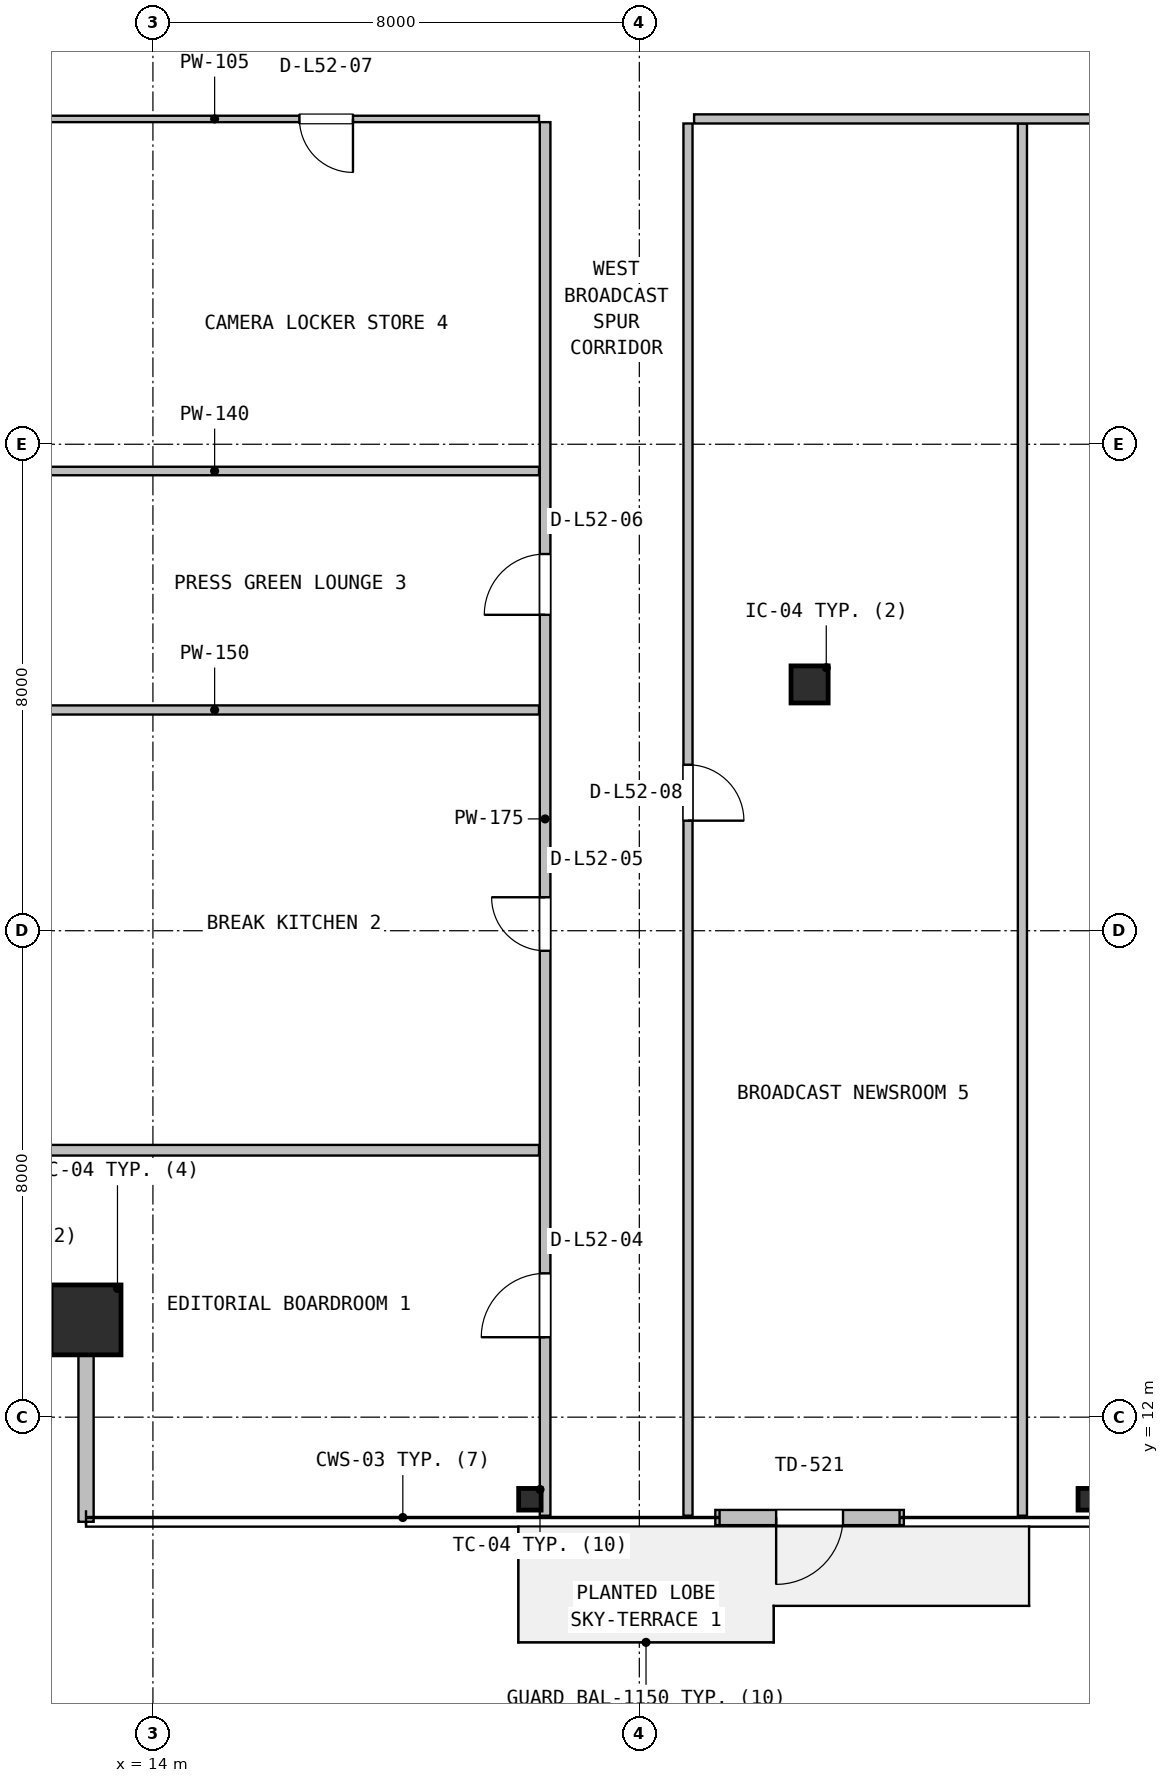
"""IFC4 building model, lengths in metres.
Left out: names, types, materials, properties, quantities, classifications, styles, units other than length and angle.
Written with IfcOpenShell. Run it as: python <this file> out.ifc"""

import sys

from ifc_helpers import new_model, si_unit, direction, frame, frame_2d, origin, origin_2d, place, context, subcontext, project, spatial, rectangle, hollow_rectangle, hollow_circle, i_section, extrude, source, transform, mapped, element, fill, save


model = new_model("IFC4")
c1 = context("Model", 3, precision=1e-05, world=origin(), true_north=direction((0.0, 1.0)))
c2 = subcontext(c1, "Body", "Model", "MODEL_VIEW")
j1 = project(units=[si_unit("LENGTHUNIT", "METRE"), si_unit("PLANEANGLEUNIT", "RADIAN")], contexts=[c1])
p1 = place(None, origin())
s1 = spatial("IfcSite", under=j1, at=p1, CompositionType="ELEMENT")
p2 = place(p1, origin())
s2 = spatial("IfcBuilding", under=s1, at=p2, CompositionType="ELEMENT")
p3 = place(p2, frame((0.0, 0.0, 211.2)))
s3 = spatial("IfcBuildingStorey", under=s2, at=p3, CompositionType="ELEMENT", Elevation=211.2)
m1 = source(origin(), c2, "Body", "SweptSolid", [
    extrude(hollow_rectangle(XDim=1.15, YDim=1.15, WallThickness=0.045, at=origin_2d()), origin(), (0.0, 0.0, 1.0), 3.8),
])
p4 = place(p3, frame((12.9, 13.6, 0.0), z_axis=(0.0, 0.0, 1.0), x_axis=(1.0, 0.0, 0.0)))
e1 = element("IfcColumn", 1, at=p4, inside=s3, PredefinedType="COLUMN", context=c2, shape_type="MappedRepresentation", body=[
    mapped(m1, transform((0.0, 0.0, 0.0), x_axis=(1.0, 0.0, 0.0), y_axis=(0.0, 1.0, 0.0), z_axis=(0.0, 0.0, 1.0), scale=1.0)),
])
m2 = source(origin(), c2, "Body", "SweptSolid", [
    extrude(i_section(OverallWidth=0.369, OverallDepth=0.356, WebThickness=0.011, FlangeThickness=0.018, FilletRadius=0.016, at=origin_2d()), origin(), (0.0, 0.0, 1.0), 3.8),
])
for number, where, z_axis, x_axis in (
    (2, (20.2, 10.65, 0.0), (0.0, 0.0, 1.0), (1.0, 0.0, 0.0)),
    (3, (29.4, 10.65, 0.0), (0.0, 0.0, 1.0), (1.0, 0.0, 0.0)),
):
    element("IfcColumn", number, at=place(p3, frame(where, z_axis=z_axis, x_axis=x_axis)), inside=s3, PredefinedType="COLUMN", context=c2, shape_type="MappedRepresentation", body=[
        mapped(m2, transform((0.0, 0.0, 0.0), x_axis=(1.0, 0.0, 0.0), y_axis=(0.0, 1.0, 0.0), z_axis=(0.0, 0.0, 1.0), scale=1.0)),
    ])
m3 = source(origin(), c2, "Body", "SweptSolid", [
    extrude(hollow_circle(Radius=0.305, WallThickness=0.025, at=origin_2d()), origin(), (0.0, 0.0, 1.0), 3.8),
])
p5 = place(p3, frame((24.8, 24.05, 0.0), z_axis=(0.0, 0.0, 1.0), x_axis=(1.0, 0.0, 0.0)))
e4 = element("IfcColumn", 4, at=p5, inside=s3, PredefinedType="COLUMN", context=c2, shape_type="MappedRepresentation", body=[
    mapped(m3, transform((0.0, 0.0, 0.0), x_axis=(1.0, 0.0, 0.0), y_axis=(0.0, 1.0, 0.0), z_axis=(0.0, 0.0, 1.0), scale=1.0)),
])
p6 = place(p3, frame((23.25, 10.35, 0.0), z_axis=(0.0, 0.0, 1.0), x_axis=(1.0, 0.0, 0.0)))
e5 = element("IfcWall", 5, at=p6, inside=s3, PredefinedType="SOLIDWALL", context=c2, shape_type="SweptSolid", body=[
    extrude(rectangle(XDim=3.1, YDim=0.25, at=frame_2d((1.55, 0.0))), origin(), (0.0, 0.0, 1.0), 3.53),
])
p7 = place(p6, frame((1.0, 0.0, 0.0)))
e6 = element("IfcOpeningElement", 6, at=p7, cuts=e5, PredefinedType="OPENING", context=c2, shape_type="SweptSolid", body=[
    extrude(rectangle(XDim=1.1, YDim=2.15, at=frame_2d((0.55, 1.075))), frame((0.0, 0.135, 0.0), z_axis=(0.0, -1.0, 0.0), x_axis=(1.0, 0.0, 0.0)), (0.0, 0.0, 1.0), 0.27),
])
p8 = place(p3, frame((12.9, 10.28, 0.0), z_axis=(0.0, 0.0, 1.0), x_axis=(0.0, 1.0, 0.0)))
e7 = element("IfcWall", 7, at=p8, inside=s3, PredefinedType="SOLIDWALL", context=c2, shape_type="SweptSolid", body=[
    extrude(rectangle(XDim=3.4, YDim=0.25, at=frame_2d((1.7, 0.0))), origin(), (0.0, 0.0, 1.0), 3.171),
])
p9 = place(p3, frame((20.45, 10.38, 0.0), z_axis=(0.0, 0.0, 1.0), x_axis=(0.0, 1.0, 0.0)))
e8 = element("IfcWall", 8, at=p9, inside=s3, PredefinedType="PARTITIONING", context=c2, shape_type="SweptSolid", body=[
    extrude(rectangle(XDim=22.917, YDim=0.175, at=frame_2d((11.458, 0.0))), origin(), (0.0, 0.0, 1.0), 3.171),
])
p10 = place(p9, frame((2.935, 0.0, 0.0)))
e9 = element("IfcOpeningElement", 9, at=p10, cuts=e8, PredefinedType="OPENING", context=c2, shape_type="SweptSolid", body=[
    extrude(rectangle(XDim=1.05, YDim=2.1, at=frame_2d((0.525, 1.05))), frame((0.0, 0.098, 0.0), z_axis=(0.0, -1.0, 0.0), x_axis=(1.0, 0.0, 0.0)), (0.0, 0.0, 1.0), 0.195),
])
p11 = place(p9, frame((9.29, 0.0, 0.0)))
e10 = element("IfcOpeningElement", 10, at=p11, cuts=e8, PredefinedType="OPENING", context=c2, shape_type="SweptSolid", body=[
    extrude(rectangle(XDim=0.88, YDim=2.06, at=frame_2d((0.44, 1.03))), frame((0.0, 0.098, 0.0), z_axis=(0.0, -1.0, 0.0), x_axis=(1.0, 0.0, 0.0)), (0.0, 0.0, 1.0), 0.195),
])
p12 = place(p9, frame((14.815, 0.0, 0.0)))
e11 = element("IfcOpeningElement", 11, at=p12, cuts=e8, PredefinedType="OPENING", context=c2, shape_type="SweptSolid", body=[
    extrude(rectangle(XDim=1.0, YDim=2.1, at=frame_2d((0.5, 1.05))), frame((0.0, 0.098, 0.0), z_axis=(0.0, -1.0, 0.0), x_axis=(1.0, 0.0, 0.0)), (0.0, 0.0, 1.0), 0.195),
])
p13 = place(p3, frame((9.68, 16.39, 0.0), z_axis=(0.0, 0.0, 1.0), x_axis=(1.0, 0.0, 0.0)))
e12 = element("IfcWall", 12, at=p13, inside=s3, PredefinedType="PARTITIONING", context=c2, shape_type="SweptSolid", body=[
    extrude(rectangle(XDim=10.67, YDim=0.175, at=frame_2d((5.335, 0.0))), origin(), (0.0, 0.0, 1.0), 3.171),
])
p14 = place(p3, frame((9.68, 23.63, 0.0), z_axis=(0.0, 0.0, 1.0), x_axis=(1.0, 0.0, 0.0)))
e13 = element("IfcWall", 13, at=p14, inside=s3, PredefinedType="PARTITIONING", context=c2, shape_type="SweptSolid", body=[
    extrude(rectangle(XDim=10.67, YDim=0.15, at=frame_2d((5.335, 0.0))), origin(), (0.0, 0.0, 1.0), 3.171),
])
p15 = place(p3, frame((9.68, 27.56, 0.0), z_axis=(0.0, 0.0, 1.0), x_axis=(1.0, 0.0, 0.0)))
e14 = element("IfcWall", 14, at=p15, inside=s3, PredefinedType="PARTITIONING", context=c2, shape_type="SweptSolid", body=[
    extrude(rectangle(XDim=10.67, YDim=0.14, at=frame_2d((5.335, 0.0))), origin(), (0.0, 0.0, 1.0), 3.171),
])
p16 = place(p3, frame((9.68, 33.35, 0.0), z_axis=(0.0, 0.0, 1.0), x_axis=(1.0, 0.0, 0.0)))
e15 = element("IfcWall", 15, at=p16, inside=s3, PredefinedType="PARTITIONING", context=c2, shape_type="SweptSolid", body=[
    extrude(rectangle(XDim=10.67, YDim=0.105, at=frame_2d((5.335, 0.0))), origin(), (0.0, 0.0, 1.0), 3.171),
])
p17 = place(p16, frame((6.73, 0.0, 0.0)))
e16 = element("IfcOpeningElement", 16, at=p17, cuts=e15, PredefinedType="OPENING", context=c2, shape_type="SweptSolid", body=[
    extrude(rectangle(XDim=0.88, YDim=2.06, at=frame_2d((0.44, 1.03))), frame((0.0, 0.062, 0.0), z_axis=(0.0, -1.0, 0.0), x_axis=(1.0, 0.0, 0.0)), (0.0, 0.0, 1.0), 0.125),
])
p18 = place(p3, frame((28.3, 10.38, 0.0), z_axis=(0.0, 0.0, 1.0), x_axis=(0.0, 1.0, 0.0)))
e17 = element("IfcWall", 17, at=p18, inside=s3, PredefinedType="PARTITIONING", context=c2, shape_type="SweptSolid", body=[
    extrude(rectangle(XDim=22.895, YDim=0.15, at=frame_2d((11.448, 0.0))), origin(), (0.0, 0.0, 1.0), 2.908),
])
p19 = place(p3, frame((22.9, 33.35, 0.0), z_axis=(0.0, 0.0, 1.0), x_axis=(1.0, 0.0, 0.0)))
e18 = element("IfcWall", 18, at=p19, inside=s3, PredefinedType="PARTITIONING", context=c2, shape_type="SweptSolid", body=[
    extrude(rectangle(XDim=22.79, YDim=0.15, at=frame_2d((11.395, 0.0))), origin(), (0.0, 0.0, 1.0), 2.908),
])
p20 = place(p19, frame((8.84, 0.0, 0.0)))
e19 = element("IfcOpeningElement", 19, at=p20, cuts=e18, PredefinedType="OPENING", context=c2, shape_type="SweptSolid", body=[
    extrude(rectangle(XDim=0.92, YDim=2.08, at=frame_2d((0.46, 1.04))), frame((0.0, 0.085, 0.0), z_axis=(0.0, -1.0, 0.0), x_axis=(1.0, 0.0, 0.0)), (0.0, 0.0, 1.0), 0.17),
])
p21 = place(p3, frame((22.8, 10.38, 0.0), z_axis=(0.0, 0.0, 1.0), x_axis=(0.0, 1.0, 0.0)))
e20 = element("IfcWall", 20, at=p21, inside=s3, PredefinedType="PARTITIONING", context=c2, shape_type="SweptSolid", body=[
    extrude(rectangle(XDim=22.895, YDim=0.15, at=frame_2d((11.448, 0.0))), origin(), (0.0, 0.0, 1.0), 3.171),
])
p22 = place(p21, frame((11.43, 0.0, 0.0)))
e21 = element("IfcOpeningElement", 21, at=p22, cuts=e20, PredefinedType="OPENING", context=c2, shape_type="SweptSolid", body=[
    extrude(rectangle(XDim=0.92, YDim=2.08, at=frame_2d((0.46, 1.04))), frame((0.0, 0.085, 0.0), z_axis=(0.0, -1.0, 0.0), x_axis=(1.0, 0.0, 0.0)), (0.0, 0.0, 1.0), 0.17),
])
m4 = source(origin(), c2, "Body", "SweptSolid", [
    extrude(rectangle(XDim=1.1, YDim=2.15, at=frame_2d((0.55, 1.075))), frame((0.0, 0.025, 0.0), z_axis=(0.0, -1.0, 0.0), x_axis=(1.0, 0.0, 0.0)), (0.0, 0.0, 1.0), 0.05),
])
p23 = place(p7, frame((1.1, 0.0, 0.0), z_axis=(0.0, 0.0, 1.0), x_axis=(-1.0, 0.0, 0.0)))
e22 = element("IfcDoor", 22, at=p23, inside=s3, OperationType="SINGLE_SWING_LEFT", PredefinedType="DOOR", context=c2, shape_type="MappedRepresentation", body=[
    mapped(m4, transform((0.0, 0.0, 0.0), x_axis=(1.0, 0.0, 0.0), y_axis=(0.0, 1.0, 0.0), z_axis=(0.0, 0.0, 1.0), scale=1.0)),
])
fill(e6, e22)
m5 = source(origin(), c2, "Body", "SweptSolid", [
    extrude(rectangle(XDim=1.05, YDim=2.1, at=frame_2d((0.525, 1.05))), frame((0.0, 0.025, 0.0), z_axis=(0.0, -1.0, 0.0), x_axis=(1.0, 0.0, 0.0)), (0.0, 0.0, 1.0), 0.05),
])
p24 = place(p10, origin())
e23 = element("IfcDoor", 23, at=p24, inside=s3, OperationType="SINGLE_SWING_LEFT", PredefinedType="DOOR", context=c2, shape_type="MappedRepresentation", body=[
    mapped(m5, transform((0.0, 0.0, 0.0), x_axis=(1.0, 0.0, 0.0), y_axis=(0.0, 1.0, 0.0), z_axis=(0.0, 0.0, 1.0), scale=1.0)),
])
fill(e9, e23)
m6 = source(origin(), c2, "Body", "SweptSolid", [
    extrude(rectangle(XDim=0.88, YDim=2.06, at=frame_2d((0.44, 1.03))), frame((0.0, 0.025, 0.0), z_axis=(0.0, -1.0, 0.0), x_axis=(1.0, 0.0, 0.0)), (0.0, 0.0, 1.0), 0.05),
])
p25 = place(p11, origin())
e24 = element("IfcDoor", 24, at=p25, inside=s3, OperationType="SINGLE_SWING_RIGHT", PredefinedType="DOOR", context=c2, shape_type="MappedRepresentation", body=[
    mapped(m6, transform((0.0, 0.0, 0.0), x_axis=(1.0, 0.0, 0.0), y_axis=(0.0, 1.0, 0.0), z_axis=(0.0, 0.0, 1.0), scale=1.0)),
])
fill(e10, e24)
m7 = source(origin(), c2, "Body", "SweptSolid", [
    extrude(rectangle(XDim=1.0, YDim=2.1, at=frame_2d((0.5, 1.05))), frame((0.0, 0.025, 0.0), z_axis=(0.0, -1.0, 0.0), x_axis=(1.0, 0.0, 0.0)), (0.0, 0.0, 1.0), 0.05),
])
p26 = place(p12, origin())
e25 = element("IfcDoor", 25, at=p26, inside=s3, OperationType="SINGLE_SWING_LEFT", PredefinedType="DOOR", context=c2, shape_type="MappedRepresentation", body=[
    mapped(m7, transform((0.0, 0.0, 0.0), x_axis=(1.0, 0.0, 0.0), y_axis=(0.0, 1.0, 0.0), z_axis=(0.0, 0.0, 1.0), scale=1.0)),
])
fill(e11, e25)
p27 = place(p17, frame((0.88, 0.0, 0.0), z_axis=(0.0, 0.0, 1.0), x_axis=(-1.0, 0.0, 0.0)))
e26 = element("IfcDoor", 26, at=p27, inside=s3, OperationType="SINGLE_SWING_RIGHT", PredefinedType="DOOR", context=c2, shape_type="MappedRepresentation", body=[
    mapped(m6, transform((0.0, 0.0, 0.0), x_axis=(1.0, 0.0, 0.0), y_axis=(0.0, 1.0, 0.0), z_axis=(0.0, 0.0, 1.0), scale=1.0)),
])
fill(e16, e26)
m8 = source(origin(), c2, "Body", "SweptSolid", [
    extrude(rectangle(XDim=0.92, YDim=2.08, at=frame_2d((0.46, 1.04))), frame((0.0, 0.025, 0.0), z_axis=(0.0, -1.0, 0.0), x_axis=(1.0, 0.0, 0.0)), (0.0, 0.0, 1.0), 0.05),
])
p28 = place(p22, frame((0.92, 0.0, 0.0), z_axis=(0.0, 0.0, 1.0), x_axis=(-1.0, 0.0, 0.0)))
e27 = element("IfcDoor", 27, at=p28, inside=s3, OperationType="SINGLE_SWING_LEFT", PredefinedType="DOOR", context=c2, shape_type="MappedRepresentation", body=[
    mapped(m8, transform((0.0, 0.0, 0.0), x_axis=(1.0, 0.0, 0.0), y_axis=(0.0, 1.0, 0.0), z_axis=(0.0, 0.0, 1.0), scale=1.0)),
])
fill(e21, e27)
save(model, sys.argv[1])
